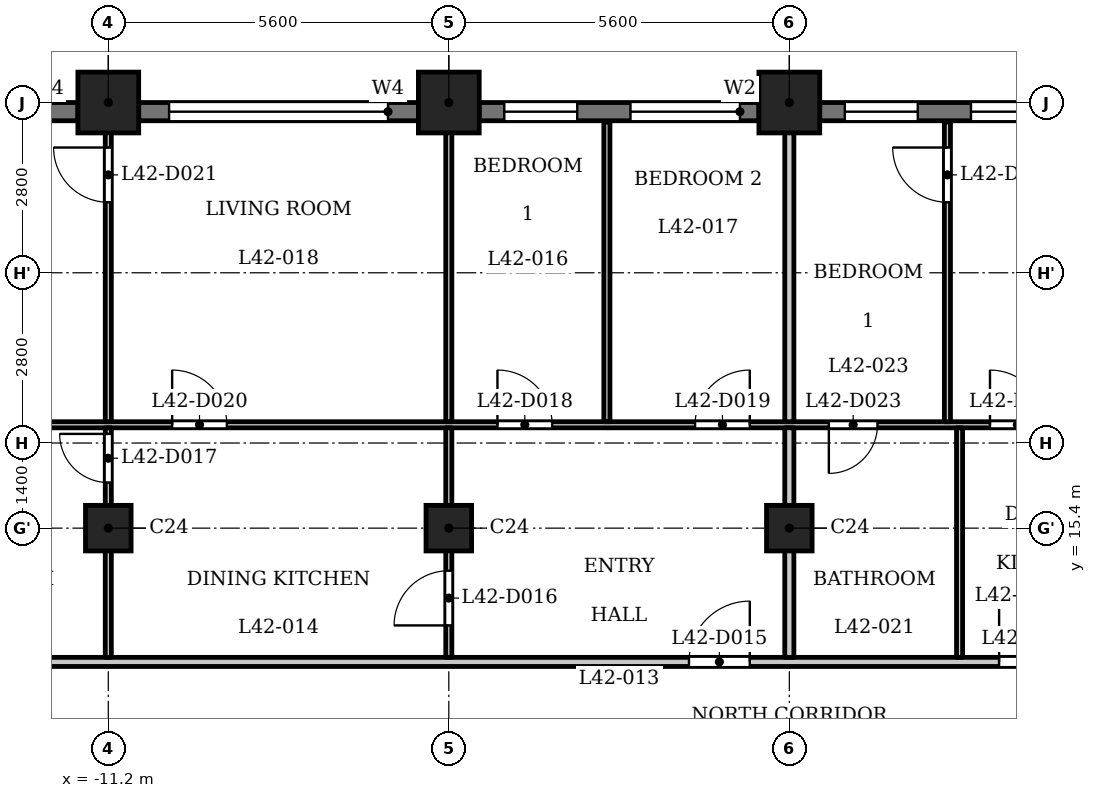
"""IFC4 building model, lengths in metres.
Left out: names, types, materials, properties, quantities, classifications, styles, units other than length and angle.
Written with IfcOpenShell. Run it as: python <this file> out.ifc"""

import sys

from ifc_helpers import new_model, si_unit, direction, frame, frame_2d, origin, origin_2d, place, context, subcontext, project, spatial, rectangle, extrude, element, fill, save


model = new_model("IFC4")
c1 = context("Model", 3, precision=1e-05, world=origin(), true_north=direction((0.0, 1.0)))
c2 = subcontext(c1, "Body", "Model", "MODEL_VIEW")
j1 = project(units=[si_unit("LENGTHUNIT", "METRE"), si_unit("PLANEANGLEUNIT", "RADIAN")], contexts=[c1])
p1 = place(None, origin())
s1 = spatial("IfcSite", under=j1, at=p1, CompositionType="ELEMENT")
p2 = place(p1, origin())
s2 = spatial("IfcBuilding", under=s1, at=p2, CompositionType="ELEMENT")
p3 = place(p2, frame((0.0, 0.0, 164.1)))
s3 = spatial("IfcBuildingStorey", under=s2, at=p3, CompositionType="ELEMENT", Elevation=164.1)
for number, where, z_axis, x_axis in (
    (1, (0.0, 22.4, 0.0), (0.0, 0.0, 1.0), (1.0, 0.0, 0.0)),
    (2, (-5.6, 22.4, 0.0), (0.0, 0.0, 1.0), (1.0, 0.0, 0.0)),
    (3, (-11.2, 22.4, 0.0), (0.0, 0.0, 1.0), (1.0, 0.0, 0.0)),
):
    element("IfcColumn", number, at=place(p3, frame(where, z_axis=z_axis, x_axis=x_axis)), inside=s3, PredefinedType="COLUMN", context=c2, shape_type="SweptSolid", body=[
        extrude(rectangle(XDim=1.0, YDim=1.0, at=origin_2d()), origin(), (0.0, 0.0, 1.0), 3.5),
    ])
for number, where, z_axis, x_axis in (
    (4, (-11.2, 15.4, 0.0), (0.0, 0.0, 1.0), (1.0, 0.0, 0.0)),
    (5, (-5.6, 15.4, 0.0), (0.0, 0.0, 1.0), (1.0, 0.0, 0.0)),
    (6, (0.0, 15.4, 0.0), (0.0, 0.0, 1.0), (1.0, 0.0, 0.0)),
):
    element("IfcColumn", number, at=place(p3, frame(where, z_axis=z_axis, x_axis=x_axis)), inside=s3, PredefinedType="COLUMN", context=c2, shape_type="SweptSolid", body=[
        extrude(rectangle(XDim=0.75, YDim=0.75, at=origin_2d()), origin(), (0.0, 0.0, 1.0), 3.5),
    ])
p4 = place(p3, frame((5.1, 22.25, 0.0), z_axis=(0.0, 0.0, 1.0), x_axis=(-1.0, 0.0, 0.0)))
e7 = element("IfcWall", 7, at=p4, inside=s3, PredefinedType="SOLIDWALL", context=c2, shape_type="SweptSolid", body=[
    extrude(rectangle(XDim=4.6, YDim=0.3, at=frame_2d((2.3, 0.0))), origin(), (0.0, 0.0, 1.0), 2.45),
])
p5 = place(p4, frame((0.312, 0.0, 0.9)))
e8 = element("IfcOpeningElement", 8, at=p5, cuts=e7, PredefinedType="OPENING", context=c2, shape_type="SweptSolid", body=[
    extrude(rectangle(XDim=1.8, YDim=1.25, at=frame_2d((0.9, 0.625))), frame((0.0, 0.16, 0.0), z_axis=(0.0, -1.0, 0.0), x_axis=(1.0, 0.0, 0.0)), (0.0, 0.0, 1.0), 0.32),
])
p6 = place(p4, frame((2.988, 0.0, 0.6)))
e9 = element("IfcOpeningElement", 9, at=p6, cuts=e7, PredefinedType="OPENING", context=c2, shape_type="SweptSolid", body=[
    extrude(rectangle(XDim=1.2, YDim=1.55, at=frame_2d((0.6, 0.775))), frame((0.0, 0.16, 0.0), z_axis=(0.0, -1.0, 0.0), x_axis=(1.0, 0.0, 0.0)), (0.0, 0.0, 1.0), 0.32),
])
p7 = place(p3, frame((-0.5, 22.25, 0.0), z_axis=(0.0, 0.0, 1.0), x_axis=(-1.0, 0.0, 0.0)))
e10 = element("IfcWall", 10, at=p7, inside=s3, PredefinedType="SOLIDWALL", context=c2, shape_type="SweptSolid", body=[
    extrude(rectangle(XDim=4.6, YDim=0.3, at=frame_2d((2.3, 0.0))), origin(), (0.0, 0.0, 1.0), 2.45),
])
p8 = place(p7, frame((0.312, 0.0, 0.9)))
e11 = element("IfcOpeningElement", 11, at=p8, cuts=e10, PredefinedType="OPENING", context=c2, shape_type="SweptSolid", body=[
    extrude(rectangle(XDim=1.8, YDim=1.25, at=frame_2d((0.9, 0.625))), frame((0.0, 0.16, 0.0), z_axis=(0.0, -1.0, 0.0), x_axis=(1.0, 0.0, 0.0)), (0.0, 0.0, 1.0), 0.32),
])
p9 = place(p7, frame((2.988, 0.0, 0.6)))
e12 = element("IfcOpeningElement", 12, at=p9, cuts=e10, PredefinedType="OPENING", context=c2, shape_type="SweptSolid", body=[
    extrude(rectangle(XDim=1.2, YDim=1.55, at=frame_2d((0.6, 0.775))), frame((0.0, 0.16, 0.0), z_axis=(0.0, -1.0, 0.0), x_axis=(1.0, 0.0, 0.0)), (0.0, 0.0, 1.0), 0.32),
])
p10 = place(p3, frame((-6.1, 22.25, 0.0), z_axis=(0.0, 0.0, 1.0), x_axis=(-1.0, 0.0, 0.0)))
e13 = element("IfcWall", 13, at=p10, inside=s3, PredefinedType="SOLIDWALL", context=c2, shape_type="SweptSolid", body=[
    extrude(rectangle(XDim=4.6, YDim=0.3, at=frame_2d((2.3, 0.0))), origin(), (0.0, 0.0, 1.0), 2.45),
])
p11 = place(p10, frame((0.5, 0.0, 1.2)))
e14 = element("IfcOpeningElement", 14, at=p11, cuts=e13, PredefinedType="OPENING", context=c2, shape_type="SweptSolid", body=[
    extrude(rectangle(XDim=3.6, YDim=0.95, at=frame_2d((1.8, 0.475))), frame((0.0, 0.16, 0.0), z_axis=(0.0, -1.0, 0.0), x_axis=(1.0, 0.0, 0.0)), (0.0, 0.0, 1.0), 0.32),
])
p12 = place(p3, frame((-11.7, 22.25, 0.0), z_axis=(0.0, 0.0, 1.0), x_axis=(-1.0, 0.0, 0.0)))
e15 = element("IfcWall", 15, at=p12, inside=s3, PredefinedType="SOLIDWALL", context=c2, shape_type="SweptSolid", body=[
    extrude(rectangle(XDim=4.6, YDim=0.3, at=frame_2d((2.3, 0.0))), origin(), (0.0, 0.0, 1.0), 2.45),
])
p13 = place(p12, frame((0.5, 0.0, 1.2)))
e16 = element("IfcOpeningElement", 16, at=p13, cuts=e15, PredefinedType="OPENING", context=c2, shape_type="SweptSolid", body=[
    extrude(rectangle(XDim=3.6, YDim=0.95, at=frame_2d((1.8, 0.475))), frame((0.0, 0.16, 0.0), z_axis=(0.0, -1.0, 0.0), x_axis=(1.0, 0.0, 0.0)), (0.0, 0.0, 1.0), 0.32),
])
p14 = place(p3, frame((-17.4, 13.2, 0.0), z_axis=(0.0, 0.0, 1.0), x_axis=(1.0, 0.0, 0.0)))
e17 = element("IfcWall", 17, at=p14, inside=s3, PredefinedType="PARTITIONING", context=c2, shape_type="SweptSolid", body=[
    extrude(rectangle(XDim=34.8, YDim=0.15, at=frame_2d((17.4, 0.0))), origin(), (0.0, 0.0, 1.0), 3.2),
])
p15 = place(p14, frame((0.25, 0.0, 0.0)))
e18 = element("IfcOpeningElement", 18, at=p15, cuts=e17, PredefinedType="OPENING", context=c2, shape_type="SweptSolid", body=[
    extrude(rectangle(XDim=1.0, YDim=2.1, at=frame_2d((0.5, 1.05))), frame((0.0, 0.085, 0.0), z_axis=(0.0, -1.0, 0.0), x_axis=(1.0, 0.0, 0.0)), (0.0, 0.0, 1.0), 0.17),
])
p16 = place(p14, frame((33.65, 0.0, 0.0)))
e19 = element("IfcOpeningElement", 19, at=p16, cuts=e17, PredefinedType="OPENING", context=c2, shape_type="SweptSolid", body=[
    extrude(rectangle(XDim=1.0, YDim=2.1, at=frame_2d((0.5, 1.05))), frame((0.0, 0.085, 0.0), z_axis=(0.0, -1.0, 0.0), x_axis=(1.0, 0.0, 0.0)), (0.0, 0.0, 1.0), 0.17),
])
p17 = place(p14, frame((15.75, 0.0, 0.0)))
e20 = element("IfcOpeningElement", 20, at=p17, cuts=e17, PredefinedType="OPENING", context=c2, shape_type="SweptSolid", body=[
    extrude(rectangle(XDim=1.0, YDim=2.1, at=frame_2d((0.5, 1.05))), frame((0.0, 0.085, 0.0), z_axis=(0.0, -1.0, 0.0), x_axis=(1.0, 0.0, 0.0)), (0.0, 0.0, 1.0), 0.17),
])
p18 = place(p14, frame((20.85, 0.0, 0.0)))
e21 = element("IfcOpeningElement", 21, at=p18, cuts=e17, PredefinedType="OPENING", context=c2, shape_type="SweptSolid", body=[
    extrude(rectangle(XDim=1.0, YDim=2.1, at=frame_2d((0.5, 1.05))), frame((0.0, 0.085, 0.0), z_axis=(0.0, -1.0, 0.0), x_axis=(1.0, 0.0, 0.0)), (0.0, 0.0, 1.0), 0.17),
])
p19 = place(p14, frame((23.55, 0.0, 0.0)))
e22 = element("IfcOpeningElement", 22, at=p19, cuts=e17, PredefinedType="OPENING", context=c2, shape_type="SweptSolid", body=[
    extrude(rectangle(XDim=1.0, YDim=2.1, at=frame_2d((0.5, 1.05))), frame((0.0, 0.085, 0.0), z_axis=(0.0, -1.0, 0.0), x_axis=(1.0, 0.0, 0.0)), (0.0, 0.0, 1.0), 0.17),
])
p20 = place(p3, frame((-16.725, 17.1, 0.0), z_axis=(0.0, 0.0, 1.0), x_axis=(1.0, 0.0, 0.0)))
e23 = element("IfcWall", 23, at=p20, inside=s3, PredefinedType="PARTITIONING", context=c2, shape_type="SweptSolid", body=[
    extrude(rectangle(XDim=33.45, YDim=0.1, at=frame_2d((16.725, 0.0))), origin(), (0.0, 0.0, 1.0), 3.2),
])
p21 = place(p20, frame((11.925, 0.0, 0.0)))
e24 = element("IfcOpeningElement", 24, at=p21, cuts=e23, PredefinedType="OPENING", context=c2, shape_type="SweptSolid", body=[
    extrude(rectangle(XDim=0.9, YDim=2.1, at=frame_2d((0.45, 1.05))), frame((0.0, 0.06, 0.0), z_axis=(0.0, -1.0, 0.0), x_axis=(1.0, 0.0, 0.0)), (0.0, 0.0, 1.0), 0.12),
])
p22 = place(p20, frame((15.175, 0.0, 0.0)))
e25 = element("IfcOpeningElement", 25, at=p22, cuts=e23, PredefinedType="OPENING", context=c2, shape_type="SweptSolid", body=[
    extrude(rectangle(XDim=0.9, YDim=2.1, at=frame_2d((0.45, 1.05))), frame((0.0, 0.06, 0.0), z_axis=(0.0, -1.0, 0.0), x_axis=(1.0, 0.0, 0.0)), (0.0, 0.0, 1.0), 0.12),
])
p23 = place(p20, frame((6.575, 0.0, 0.0)))
e26 = element("IfcOpeningElement", 26, at=p23, cuts=e23, PredefinedType="OPENING", context=c2, shape_type="SweptSolid", body=[
    extrude(rectangle(XDim=0.9, YDim=2.1, at=frame_2d((0.45, 1.05))), frame((0.0, 0.06, 0.0), z_axis=(0.0, -1.0, 0.0), x_axis=(1.0, 0.0, 0.0)), (0.0, 0.0, 1.0), 0.12),
])
p24 = place(p20, frame((17.375, 0.0, 0.0)))
e27 = element("IfcOpeningElement", 27, at=p24, cuts=e23, PredefinedType="OPENING", context=c2, shape_type="SweptSolid", body=[
    extrude(rectangle(XDim=0.8, YDim=2.1, at=frame_2d((0.4, 1.05))), frame((0.0, 0.06, 0.0), z_axis=(0.0, -1.0, 0.0), x_axis=(1.0, 0.0, 0.0)), (0.0, 0.0, 1.0), 0.12),
])
p25 = place(p20, frame((20.025, 0.0, 0.0)))
e28 = element("IfcOpeningElement", 28, at=p25, cuts=e23, PredefinedType="OPENING", context=c2, shape_type="SweptSolid", body=[
    extrude(rectangle(XDim=0.9, YDim=2.1, at=frame_2d((0.45, 1.05))), frame((0.0, 0.06, 0.0), z_axis=(0.0, -1.0, 0.0), x_axis=(1.0, 0.0, 0.0)), (0.0, 0.0, 1.0), 0.12),
])
p26 = place(p20, frame((26.425, 0.0, 0.0)))
e29 = element("IfcOpeningElement", 29, at=p26, cuts=e23, PredefinedType="OPENING", context=c2, shape_type="SweptSolid", body=[
    extrude(rectangle(XDim=0.8, YDim=2.1, at=frame_2d((0.4, 1.05))), frame((0.0, 0.06, 0.0), z_axis=(0.0, -1.0, 0.0), x_axis=(1.0, 0.0, 0.0)), (0.0, 0.0, 1.0), 0.12),
])
p27 = place(p20, frame((23.025, 0.0, 0.0)))
e30 = element("IfcOpeningElement", 30, at=p27, cuts=e23, PredefinedType="OPENING", context=c2, shape_type="SweptSolid", body=[
    extrude(rectangle(XDim=0.9, YDim=2.1, at=frame_2d((0.45, 1.05))), frame((0.0, 0.06, 0.0), z_axis=(0.0, -1.0, 0.0), x_axis=(1.0, 0.0, 0.0)), (0.0, 0.0, 1.0), 0.12),
])
p28 = place(p20, frame((28.575, 0.0, 0.0)))
e31 = element("IfcOpeningElement", 31, at=p28, cuts=e23, PredefinedType="OPENING", context=c2, shape_type="SweptSolid", body=[
    extrude(rectangle(XDim=0.8, YDim=2.1, at=frame_2d((0.4, 1.05))), frame((0.0, 0.06, 0.0), z_axis=(0.0, -1.0, 0.0), x_axis=(1.0, 0.0, 0.0)), (0.0, 0.0, 1.0), 0.12),
])
p29 = place(p20, frame((30.725, 0.0, 0.0)))
e32 = element("IfcOpeningElement", 32, at=p29, cuts=e23, PredefinedType="OPENING", context=c2, shape_type="SweptSolid", body=[
    extrude(rectangle(XDim=0.9, YDim=2.1, at=frame_2d((0.45, 1.05))), frame((0.0, 0.06, 0.0), z_axis=(0.0, -1.0, 0.0), x_axis=(1.0, 0.0, 0.0)), (0.0, 0.0, 1.0), 0.12),
])
p30 = place(p3, frame((-11.2, 13.275, 0.0), z_axis=(0.0, 0.0, 1.0), x_axis=(0.0, 1.0, 0.0)))
e33 = element("IfcWall", 33, at=p30, inside=s3, PredefinedType="PARTITIONING", context=c2, shape_type="SweptSolid", body=[
    extrude(rectangle(XDim=3.775, YDim=0.1, at=frame_2d((1.888, 0.0))), origin(), (0.0, 0.0, 1.0), 3.2),
])
p31 = place(p30, frame((2.875, 0.0, 0.0)))
e34 = element("IfcOpeningElement", 34, at=p31, cuts=e33, PredefinedType="OPENING", context=c2, shape_type="SweptSolid", body=[
    extrude(rectangle(XDim=0.8, YDim=2.1, at=frame_2d((0.4, 1.05))), frame((0.0, 0.06, 0.0), z_axis=(0.0, -1.0, 0.0), x_axis=(1.0, 0.0, 0.0)), (0.0, 0.0, 1.0), 0.12),
])
p32 = place(p3, frame((-11.2, 17.15, 0.0), z_axis=(0.0, 0.0, 1.0), x_axis=(0.0, 1.0, 0.0)))
e35 = element("IfcWall", 35, at=p32, inside=s3, PredefinedType="PARTITIONING", context=c2, shape_type="SweptSolid", body=[
    extrude(rectangle(XDim=5.73, YDim=0.1, at=frame_2d((2.865, 0.0))), origin(), (0.0, 0.0, 1.0), 3.2),
])
p33 = place(p32, frame((3.61, 0.0, 0.0)))
e36 = element("IfcOpeningElement", 36, at=p33, cuts=e35, PredefinedType="OPENING", context=c2, shape_type="SweptSolid", body=[
    extrude(rectangle(XDim=0.9, YDim=2.1, at=frame_2d((0.45, 1.05))), frame((0.0, 0.06, 0.0), z_axis=(0.0, -1.0, 0.0), x_axis=(1.0, 0.0, 0.0)), (0.0, 0.0, 1.0), 0.12),
])
p34 = place(p3, frame((-5.6, 13.275, 0.0), z_axis=(0.0, 0.0, 1.0), x_axis=(0.0, 1.0, 0.0)))
e37 = element("IfcWall", 37, at=p34, inside=s3, PredefinedType="PARTITIONING", context=c2, shape_type="SweptSolid", body=[
    extrude(rectangle(XDim=3.775, YDim=0.1, at=frame_2d((1.888, 0.0))), origin(), (0.0, 0.0, 1.0), 3.2),
])
p35 = place(p34, frame((0.525, 0.0, 0.0)))
e38 = element("IfcOpeningElement", 38, at=p35, cuts=e37, PredefinedType="OPENING", context=c2, shape_type="SweptSolid", body=[
    extrude(rectangle(XDim=0.9, YDim=2.1, at=frame_2d((0.45, 1.05))), frame((0.0, 0.06, 0.0), z_axis=(0.0, -1.0, 0.0), x_axis=(1.0, 0.0, 0.0)), (0.0, 0.0, 1.0), 0.12),
])
p36 = place(p3, frame((-5.6, 17.15, 0.0), z_axis=(0.0, 0.0, 1.0), x_axis=(0.0, 1.0, 0.0)))
e39 = element("IfcWall", 39, at=p36, inside=s3, PredefinedType="PARTITIONING", context=c2, shape_type="SweptSolid", body=[
    extrude(rectangle(XDim=5.73, YDim=0.1, at=frame_2d((2.865, 0.0))), origin(), (0.0, 0.0, 1.0), 3.2),
])
p37 = place(p3, frame((-3.0, 17.15, 0.0), z_axis=(0.0, 0.0, 1.0), x_axis=(0.0, 1.0, 0.0)))
e40 = element("IfcWall", 40, at=p37, inside=s3, PredefinedType="PARTITIONING", context=c2, shape_type="SweptSolid", body=[
    extrude(rectangle(XDim=4.93, YDim=0.1, at=frame_2d((2.465, 0.0))), origin(), (0.0, 0.0, 1.0), 3.2),
])
p38 = place(p3, frame((0.0, 13.275, 0.0), z_axis=(0.0, 0.0, 1.0), x_axis=(0.0, 1.0, 0.0)))
e41 = element("IfcWall", 41, at=p38, inside=s3, PredefinedType="PARTITIONING", context=c2, shape_type="SweptSolid", body=[
    extrude(rectangle(XDim=3.775, YDim=0.15, at=frame_2d((1.888, 0.0))), origin(), (0.0, 0.0, 1.0), 3.2),
])
p39 = place(p3, frame((0.0, 17.15, 0.0), z_axis=(0.0, 0.0, 1.0), x_axis=(0.0, 1.0, 0.0)))
e42 = element("IfcWall", 42, at=p39, inside=s3, PredefinedType="PARTITIONING", context=c2, shape_type="SweptSolid", body=[
    extrude(rectangle(XDim=5.73, YDim=0.15, at=frame_2d((2.865, 0.0))), origin(), (0.0, 0.0, 1.0), 3.2),
])
p40 = place(p3, frame((2.6, 17.15, 0.0), z_axis=(0.0, 0.0, 1.0), x_axis=(0.0, 1.0, 0.0)))
e43 = element("IfcWall", 43, at=p40, inside=s3, PredefinedType="PARTITIONING", context=c2, shape_type="SweptSolid", body=[
    extrude(rectangle(XDim=4.93, YDim=0.1, at=frame_2d((2.465, 0.0))), origin(), (0.0, 0.0, 1.0), 3.2),
])
p41 = place(p40, frame((3.61, 0.0, 0.0)))
e44 = element("IfcOpeningElement", 44, at=p41, cuts=e43, PredefinedType="OPENING", context=c2, shape_type="SweptSolid", body=[
    extrude(rectangle(XDim=0.9, YDim=2.1, at=frame_2d((0.45, 1.05))), frame((0.0, 0.06, 0.0), z_axis=(0.0, -1.0, 0.0), x_axis=(1.0, 0.0, 0.0)), (0.0, 0.0, 1.0), 0.12),
])
p42 = place(p3, frame((2.8, 13.275, 0.0), z_axis=(0.0, 0.0, 1.0), x_axis=(0.0, 1.0, 0.0)))
e45 = element("IfcWall", 45, at=p42, inside=s3, PredefinedType="PARTITIONING", context=c2, shape_type="SweptSolid", body=[
    extrude(rectangle(XDim=3.775, YDim=0.1, at=frame_2d((1.888, 0.0))), origin(), (0.0, 0.0, 1.0), 3.2),
])
p43 = place(p17, origin())
e46 = element("IfcDoor", 46, at=p43, inside=s3, OperationType="SINGLE_SWING_LEFT", PredefinedType="DOOR", context=c2, shape_type="SweptSolid", body=[
    extrude(rectangle(XDim=1.0, YDim=2.1, at=frame_2d((0.5, 1.05))), frame((0.0, 0.025, 0.0), z_axis=(0.0, -1.0, 0.0), x_axis=(1.0, 0.0, 0.0)), (0.0, 0.0, 1.0), 0.05),
])
fill(e20, e46)
p44 = place(p35, origin())
e47 = element("IfcDoor", 47, at=p44, inside=s3, OperationType="SINGLE_SWING_RIGHT", PredefinedType="DOOR", context=c2, shape_type="SweptSolid", body=[
    extrude(rectangle(XDim=0.9, YDim=2.1, at=frame_2d((0.45, 1.05))), frame((0.0, 0.025, 0.0), z_axis=(0.0, -1.0, 0.0), x_axis=(1.0, 0.0, 0.0)), (0.0, 0.0, 1.0), 0.05),
])
fill(e38, e47)
p45 = place(p31, origin())
e48 = element("IfcDoor", 48, at=p45, inside=s3, OperationType="SINGLE_SWING_LEFT", PredefinedType="DOOR", context=c2, shape_type="SweptSolid", body=[
    extrude(rectangle(XDim=0.8, YDim=2.1, at=frame_2d((0.4, 1.05))), frame((0.0, 0.025, 0.0), z_axis=(0.0, -1.0, 0.0), x_axis=(1.0, 0.0, 0.0)), (0.0, 0.0, 1.0), 0.05),
])
fill(e34, e48)
p46 = place(p21, origin())
e49 = element("IfcDoor", 49, at=p46, inside=s3, OperationType="SINGLE_SWING_RIGHT", PredefinedType="DOOR", context=c2, shape_type="SweptSolid", body=[
    extrude(rectangle(XDim=0.9, YDim=2.1, at=frame_2d((0.45, 1.05))), frame((0.0, 0.025, 0.0), z_axis=(0.0, -1.0, 0.0), x_axis=(1.0, 0.0, 0.0)), (0.0, 0.0, 1.0), 0.05),
])
fill(e24, e49)
p47 = place(p22, origin())
e50 = element("IfcDoor", 50, at=p47, inside=s3, OperationType="SINGLE_SWING_LEFT", PredefinedType="DOOR", context=c2, shape_type="SweptSolid", body=[
    extrude(rectangle(XDim=0.9, YDim=2.1, at=frame_2d((0.45, 1.05))), frame((0.0, 0.025, 0.0), z_axis=(0.0, -1.0, 0.0), x_axis=(1.0, 0.0, 0.0)), (0.0, 0.0, 1.0), 0.05),
])
fill(e25, e50)
p48 = place(p23, origin())
e51 = element("IfcDoor", 51, at=p48, inside=s3, OperationType="SINGLE_SWING_RIGHT", PredefinedType="DOOR", context=c2, shape_type="SweptSolid", body=[
    extrude(rectangle(XDim=0.9, YDim=2.1, at=frame_2d((0.45, 1.05))), frame((0.0, 0.025, 0.0), z_axis=(0.0, -1.0, 0.0), x_axis=(1.0, 0.0, 0.0)), (0.0, 0.0, 1.0), 0.05),
])
fill(e26, e51)
p49 = place(p33, origin())
e52 = element("IfcDoor", 52, at=p49, inside=s3, OperationType="SINGLE_SWING_LEFT", PredefinedType="DOOR", context=c2, shape_type="SweptSolid", body=[
    extrude(rectangle(XDim=0.9, YDim=2.1, at=frame_2d((0.45, 1.05))), frame((0.0, 0.025, 0.0), z_axis=(0.0, -1.0, 0.0), x_axis=(1.0, 0.0, 0.0)), (0.0, 0.0, 1.0), 0.05),
])
fill(e36, e52)
p50 = place(p18, origin())
e53 = element("IfcDoor", 53, at=p50, inside=s3, OperationType="SINGLE_SWING_RIGHT", PredefinedType="DOOR", context=c2, shape_type="SweptSolid", body=[
    extrude(rectangle(XDim=1.0, YDim=2.1, at=frame_2d((0.5, 1.05))), frame((0.0, 0.025, 0.0), z_axis=(0.0, -1.0, 0.0), x_axis=(1.0, 0.0, 0.0)), (0.0, 0.0, 1.0), 0.05),
])
fill(e21, e53)
p51 = place(p24, origin())
e54 = element("IfcDoor", 54, at=p51, inside=s3, OperationType="SINGLE_SWING_LEFT", PredefinedType="DOOR", context=c2, shape_type="SweptSolid", body=[
    extrude(rectangle(XDim=0.8, YDim=2.1, at=frame_2d((0.4, 1.05))), frame((0.0, 0.025, 0.0), z_axis=(0.0, -1.0, 0.0), x_axis=(1.0, 0.0, 0.0)), (0.0, 0.0, 1.0), 0.05),
])
fill(e27, e54)
p52 = place(p25, origin())
e55 = element("IfcDoor", 55, at=p52, inside=s3, OperationType="SINGLE_SWING_RIGHT", PredefinedType="DOOR", context=c2, shape_type="SweptSolid", body=[
    extrude(rectangle(XDim=0.9, YDim=2.1, at=frame_2d((0.45, 1.05))), frame((0.0, 0.025, 0.0), z_axis=(0.0, -1.0, 0.0), x_axis=(1.0, 0.0, 0.0)), (0.0, 0.0, 1.0), 0.05),
])
fill(e28, e55)
p53 = place(p41, origin())
e56 = element("IfcDoor", 56, at=p53, inside=s3, OperationType="SINGLE_SWING_LEFT", PredefinedType="DOOR", context=c2, shape_type="SweptSolid", body=[
    extrude(rectangle(XDim=0.9, YDim=2.1, at=frame_2d((0.45, 1.05))), frame((0.0, 0.025, 0.0), z_axis=(0.0, -1.0, 0.0), x_axis=(1.0, 0.0, 0.0)), (0.0, 0.0, 1.0), 0.05),
])
fill(e44, e56)
p54 = place(p5, origin())
e57 = element("IfcWindow", 57, at=p54, inside=s3, PartitioningType="SINGLE_PANEL", PredefinedType="WINDOW", context=c2, shape_type="SweptSolid", body=[
    extrude(rectangle(XDim=1.8, YDim=1.25, at=frame_2d((0.9, 0.625))), frame((0.0, 0.03, 0.0), z_axis=(0.0, -1.0, 0.0), x_axis=(1.0, 0.0, 0.0)), (0.0, 0.0, 1.0), 0.06),
])
fill(e8, e57)
p55 = place(p6, origin())
e58 = element("IfcWindow", 58, at=p55, inside=s3, PartitioningType="SINGLE_PANEL", PredefinedType="WINDOW", context=c2, shape_type="SweptSolid", body=[
    extrude(rectangle(XDim=1.2, YDim=1.55, at=frame_2d((0.6, 0.775))), frame((0.0, 0.03, 0.0), z_axis=(0.0, -1.0, 0.0), x_axis=(1.0, 0.0, 0.0)), (0.0, 0.0, 1.0), 0.06),
])
fill(e9, e58)
p56 = place(p8, origin())
e59 = element("IfcWindow", 59, at=p56, inside=s3, PartitioningType="SINGLE_PANEL", PredefinedType="WINDOW", context=c2, shape_type="SweptSolid", body=[
    extrude(rectangle(XDim=1.8, YDim=1.25, at=frame_2d((0.9, 0.625))), frame((0.0, 0.03, 0.0), z_axis=(0.0, -1.0, 0.0), x_axis=(1.0, 0.0, 0.0)), (0.0, 0.0, 1.0), 0.06),
])
fill(e11, e59)
p57 = place(p9, origin())
e60 = element("IfcWindow", 60, at=p57, inside=s3, PartitioningType="SINGLE_PANEL", PredefinedType="WINDOW", context=c2, shape_type="SweptSolid", body=[
    extrude(rectangle(XDim=1.2, YDim=1.55, at=frame_2d((0.6, 0.775))), frame((0.0, 0.03, 0.0), z_axis=(0.0, -1.0, 0.0), x_axis=(1.0, 0.0, 0.0)), (0.0, 0.0, 1.0), 0.06),
])
fill(e12, e60)
p58 = place(p11, origin())
e61 = element("IfcWindow", 61, at=p58, inside=s3, PartitioningType="SINGLE_PANEL", PredefinedType="WINDOW", context=c2, shape_type="SweptSolid", body=[
    extrude(rectangle(XDim=3.6, YDim=0.95, at=frame_2d((1.8, 0.475))), frame((0.0, 0.03, 0.0), z_axis=(0.0, -1.0, 0.0), x_axis=(1.0, 0.0, 0.0)), (0.0, 0.0, 1.0), 0.06),
])
fill(e14, e61)
save(model, sys.argv[1])
